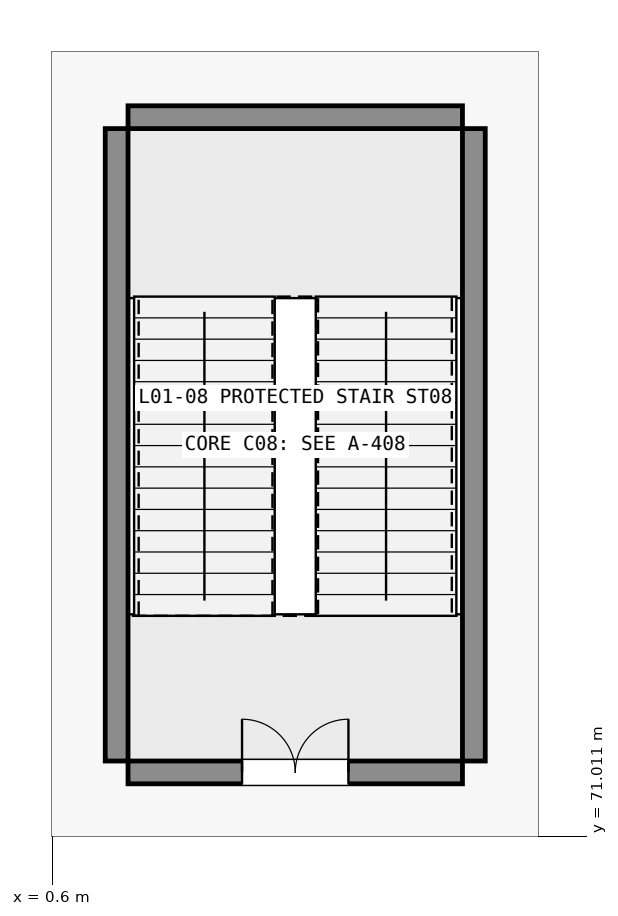
"""IFC4 building model, lengths in metres.
Left out: names, types, materials, properties, quantities, classifications, styles, units other than length and angle.
Written with IfcOpenShell. Run it as: python <this file> out.ifc"""

import sys

from ifc_helpers import new_model, si_unit, direction, frame, frame_2d, origin, place, context, subcontext, project, spatial, rectangle, extrude, element, fill, save


model = new_model("IFC4")
c1 = context("Model", 3, precision=1e-05, world=origin(), true_north=direction((0.0, 1.0)))
c2 = subcontext(c1, "Body", "Model", "MODEL_VIEW")
j1 = project(units=[si_unit("LENGTHUNIT", "METRE"), si_unit("PLANEANGLEUNIT", "RADIAN")], contexts=[c1])
p1 = place(None, origin())
s1 = spatial("IfcSite", under=j1, at=p1, CompositionType="ELEMENT")
p2 = place(p1, origin())
s2 = spatial("IfcBuilding", under=s1, at=p2, CompositionType="ELEMENT")
p3 = place(p2, frame((0.0, 0.0, 6.0)))
s3 = spatial("IfcBuildingStorey", under=s2, at=p3, CompositionType="ELEMENT", Elevation=6.0)
p4 = place(p3, frame((1.6, 71.85, 0.0), z_axis=(0.0, 0.0, 1.0), x_axis=(1.0, 0.0, 0.0)))
e1 = element("IfcWall", 1, at=p4, inside=s3, PredefinedType="SHEAR", context=c2, shape_type="SweptSolid", body=[
    extrude(rectangle(XDim=4.4, YDim=0.3, at=frame_2d((2.2, 0.0))), origin(), (0.0, 0.0, 1.0), 5.4),
])
p5 = place(p4, frame((1.5, 0.0, 0.0)))
e2 = element("IfcOpeningElement", 2, at=p5, cuts=e1, PredefinedType="OPENING", context=c2, shape_type="SweptSolid", body=[
    extrude(rectangle(XDim=1.4, YDim=2.2, at=frame_2d((0.7, 1.1))), frame((0.0, 0.16, 0.0), z_axis=(0.0, -1.0, 0.0), x_axis=(1.0, 0.0, 0.0)), (0.0, 0.0, 1.0), 0.32),
])
p6 = place(p3, frame((1.6, 80.47, 0.0), z_axis=(0.0, 0.0, 1.0), x_axis=(1.0, 0.0, 0.0)))
e3 = element("IfcWall", 3, at=p6, inside=s3, PredefinedType="SHEAR", context=c2, shape_type="SweptSolid", body=[
    extrude(rectangle(XDim=4.4, YDim=0.3, at=frame_2d((2.2, 0.0))), origin(), (0.0, 0.0, 1.0), 5.4),
])
for number, where, z_axis, x_axis in (
    (4, (1.45, 72.0, 0.0), (0.0, 0.0, 1.0), (0.0, 1.0, 0.0)),
    (5, (6.15, 72.0, 0.0), (0.0, 0.0, 1.0), (0.0, 1.0, 0.0)),
):
    element("IfcWall", number, at=place(p3, frame(where, z_axis=z_axis, x_axis=x_axis)), inside=s3, PredefinedType="SHEAR", context=c2, shape_type="SweptSolid", body=[
        extrude(rectangle(XDim=8.32, YDim=0.3, at=frame_2d((4.16, 0.0))), origin(), (0.0, 0.0, 1.0), 5.4),
    ])
p7 = place(p5, origin())
e6 = element("IfcDoor", 6, at=p7, inside=s3, OperationType="DOUBLE_DOOR_SINGLE_SWING", PredefinedType="DOOR", context=c2, shape_type="SweptSolid", body=[
    extrude(rectangle(XDim=1.4, YDim=2.2, at=frame_2d((0.7, 1.1))), frame((0.0, 0.025, 0.0), z_axis=(0.0, -1.0, 0.0), x_axis=(1.0, 0.0, 0.0)), (0.0, 0.0, 1.0), 0.05),
])
fill(e2, e6)
save(model, sys.argv[1])
